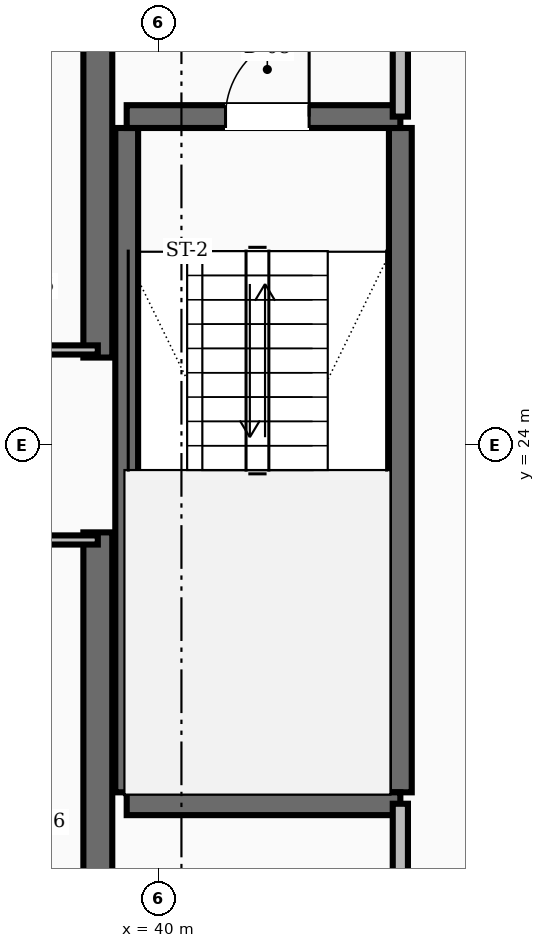
"""IFC4 building model, lengths in metres.
Left out: names, types, materials, properties, quantities, classifications, styles, units other than length and angle.
Written with IfcOpenShell. Run it as: python <this file> out.ifc"""

import sys

from ifc_helpers import new_model, si_unit, direction, frame, frame_2d, origin, place, context, subcontext, project, spatial, rectangle, extrude, element, fill, save


model = new_model("IFC4")
c1 = context("Model", 3, precision=1e-05, world=origin(), true_north=direction((0.0, 1.0)))
c2 = subcontext(c1, "Body", "Model", "MODEL_VIEW")
j1 = project(units=[si_unit("LENGTHUNIT", "METRE"), si_unit("PLANEANGLEUNIT", "RADIAN")], contexts=[c1])
p1 = place(None, origin())
s1 = spatial("IfcSite", under=j1, at=p1, CompositionType="ELEMENT")
p2 = place(p1, origin())
s2 = spatial("IfcBuilding", under=s1, at=p2, CompositionType="ELEMENT")
p3 = place(p2, frame((0.0, 0.0, 95.2)))
s3 = spatial("IfcBuildingStorey", under=s2, at=p3, CompositionType="ELEMENT", Elevation=95.2)
for number, where, z_axis, x_axis in (
    (1, (39.2, 16.55, 0.0), (0.0, 0.0, 1.0), (0.0, 1.0, 0.0)),
    (2, (39.2, 25.15, 0.0), (0.0, 0.0, 1.0), (0.0, 1.0, 0.0)),
):
    element("IfcWall", number, at=place(p3, frame(where, z_axis=z_axis, x_axis=x_axis)), inside=s3, PredefinedType="SHEAR", context=c2, shape_type="SweptSolid", body=[
        extrude(rectangle(XDim=6.3, YDim=0.38, at=frame_2d((3.15, 0.0))), origin(), (0.0, 0.0, 1.0), 3.6),
    ])
for number, where, z_axis, x_axis in (
    (3, (43.18, 19.43, 0.0), (0.0, 0.0, 1.0), (0.0, 1.0, 0.0)),
    (4, (39.58, 19.43, 0.0), (0.0, 0.0, 1.0), (0.0, 1.0, 0.0)),
):
    element("IfcWall", number, at=place(p3, frame(where, z_axis=z_axis, x_axis=x_axis)), inside=s3, PredefinedType="SHEAR", context=c2, shape_type="SweptSolid", body=[
        extrude(rectangle(XDim=8.74, YDim=0.3, at=frame_2d((4.37, 0.0))), origin(), (0.0, 0.0, 1.0), 3.6),
    ])
p4 = place(p3, frame((39.58, 19.28, 0.0), z_axis=(0.0, 0.0, 1.0), x_axis=(1.0, 0.0, 0.0)))
e5 = element("IfcWall", 5, at=p4, inside=s3, PredefinedType="SHEAR", context=c2, shape_type="SweptSolid", body=[
    extrude(rectangle(XDim=3.6, YDim=0.3, at=frame_2d((1.8, 0.0))), origin(), (0.0, 0.0, 1.0), 3.6),
])
p5 = place(p3, frame((39.58, 28.32, 0.0), z_axis=(0.0, 0.0, 1.0), x_axis=(1.0, 0.0, 0.0)))
e6 = element("IfcWall", 6, at=p5, inside=s3, PredefinedType="SHEAR", context=c2, shape_type="SweptSolid", body=[
    extrude(rectangle(XDim=3.6, YDim=0.3, at=frame_2d((1.8, 0.0))), origin(), (0.0, 0.0, 1.0), 3.6),
])
p6 = place(p5, frame((1.3, 0.0, 0.0)))
e7 = element("IfcOpeningElement", 7, at=p6, cuts=e6, PredefinedType="OPENING", context=c2, shape_type="SweptSolid", body=[
    extrude(rectangle(XDim=1.1, YDim=2.1, at=frame_2d((0.55, 1.05))), frame((0.0, 0.16, 0.0), z_axis=(0.0, -1.0, 0.0), x_axis=(1.0, 0.0, 0.0)), (0.0, 0.0, 1.0), 0.32),
])
p7 = place(p3, frame((43.18, 28.32, 0.0), z_axis=(0.0, 0.0, 1.0), x_axis=(0.0, 1.0, 0.0)))
e8 = element("IfcWall", 8, at=p7, inside=s3, PredefinedType="SOLIDWALL", context=c2, shape_type="SweptSolid", body=[
    extrude(rectangle(XDim=3.13, YDim=0.2, at=frame_2d((1.565, 0.0))), origin(), (0.0, 0.0, 1.0), 2.71),
])
p8 = place(p7, frame((1.015, 0.0, 0.0)))
e9 = element("IfcOpeningElement", 9, at=p8, cuts=e8, PredefinedType="OPENING", context=c2, shape_type="SweptSolid", body=[
    extrude(rectangle(XDim=1.1, YDim=2.1, at=frame_2d((0.55, 1.05))), frame((0.0, 0.11, 0.0), z_axis=(0.0, -1.0, 0.0), x_axis=(1.0, 0.0, 0.0)), (0.0, 0.0, 1.0), 0.22),
])
p9 = place(p3, frame((43.18, 16.55, 0.0), z_axis=(0.0, 0.0, 1.0), x_axis=(0.0, 1.0, 0.0)))
e10 = element("IfcWall", 10, at=p9, inside=s3, PredefinedType="SOLIDWALL", context=c2, shape_type="SweptSolid", body=[
    extrude(rectangle(XDim=2.73, YDim=0.2, at=frame_2d((1.365, 0.0))), origin(), (0.0, 0.0, 1.0), 2.71),
])
p10 = place(p9, frame((0.89, 0.0, 0.0)))
e11 = element("IfcOpeningElement", 11, at=p10, cuts=e10, PredefinedType="OPENING", context=c2, shape_type="SweptSolid", body=[
    extrude(rectangle(XDim=0.95, YDim=2.1, at=frame_2d((0.475, 1.05))), frame((0.0, 0.11, 0.0), z_axis=(0.0, -1.0, 0.0), x_axis=(1.0, 0.0, 0.0)), (0.0, 0.0, 1.0), 0.22),
])
for number, where, z_axis, x_axis in (
    (12, (37.4, 25.25, 0.0), (0.0, 0.0, 1.0), (1.0, 0.0, 0.0)),
    (13, (37.4, 22.75, 0.0), (0.0, 0.0, 1.0), (1.0, 0.0, 0.0)),
):
    element("IfcWall", number, at=place(p3, frame(where, z_axis=z_axis, x_axis=x_axis)), inside=s3, PredefinedType="PARTITIONING", context=c2, shape_type="SweptSolid", body=[
        extrude(rectangle(XDim=1.8, YDim=0.12, at=frame_2d((0.9, 0.0))), origin(), (0.0, 0.0, 1.0), 2.71),
    ])
p11 = place(p6, origin())
e14 = element("IfcDoor", 14, at=p11, inside=s3, OperationType="SINGLE_SWING_RIGHT", PredefinedType="DOOR", context=c2, shape_type="SweptSolid", body=[
    extrude(rectangle(XDim=1.1, YDim=2.1, at=frame_2d((0.55, 1.05))), frame((0.0, 0.025, 0.0), z_axis=(0.0, -1.0, 0.0), x_axis=(1.0, 0.0, 0.0)), (0.0, 0.0, 1.0), 0.05),
])
fill(e7, e14)
save(model, sys.argv[1])
